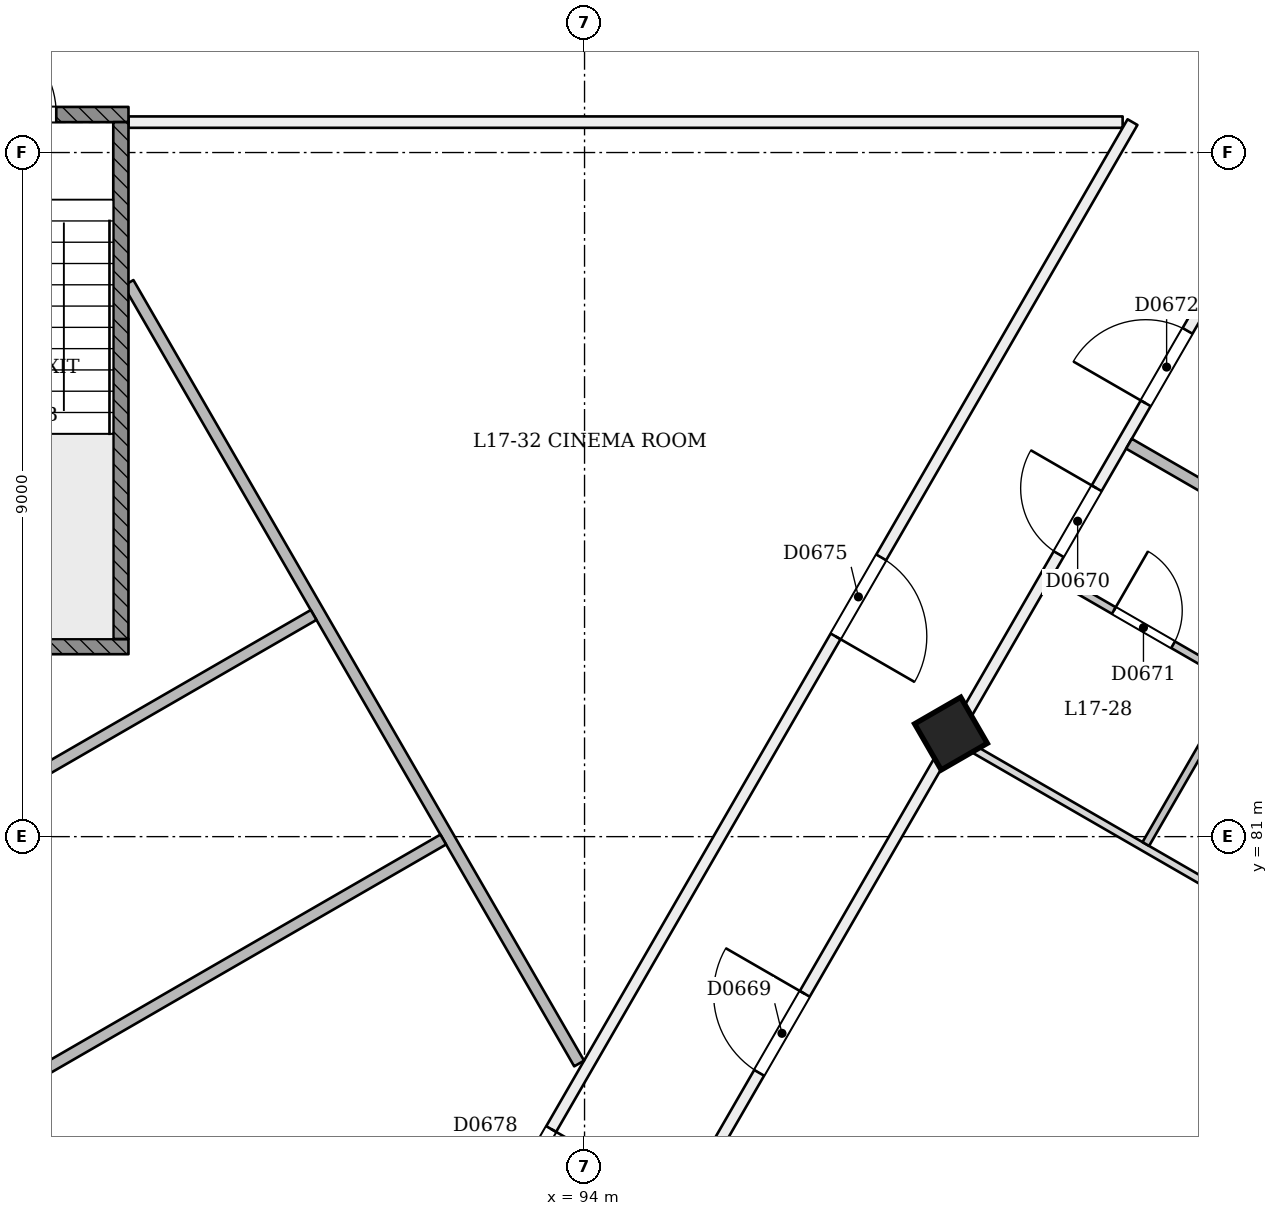
"""IFC4 building model, lengths in metres.
Left out: names, types, materials, properties, quantities, classifications, styles, units other than length and angle.
Written with IfcOpenShell. Run it as: python <this file> out.ifc"""

import sys

from ifc_helpers import new_model, si_unit, direction, frame, frame_2d, origin, origin_2d, place, context, subcontext, project, spatial, rectangle, extrude, element, fill, save


model = new_model("IFC4")
c1 = context("Model", 3, precision=1e-05, world=origin(), true_north=direction((0.0, 1.0)))
c2 = subcontext(c1, "Body", "Model", "MODEL_VIEW")
j1 = project(units=[si_unit("LENGTHUNIT", "METRE"), si_unit("PLANEANGLEUNIT", "RADIAN")], contexts=[c1])
p1 = place(None, origin())
s1 = spatial("IfcSite", under=j1, at=p1, CompositionType="ELEMENT")
p2 = place(p1, origin())
s2 = spatial("IfcBuilding", under=s1, at=p2, CompositionType="ELEMENT")
p3 = place(p2, frame((0.0, 0.0, 70.2)))
s3 = spatial("IfcBuildingStorey", under=s2, at=p3, CompositionType="ELEMENT", Elevation=70.2)
p4 = place(p3, frame((98.848, 82.309, -0.021), z_axis=(-0.022153634206, 0.038480930364, 0.999013730882), x_axis=(-0.501312869297, -0.864981219678, 0.022201276585)))
e1 = element("IfcColumn", 1, at=p4, inside=s3, PredefinedType="COLUMN", context=c2, shape_type="SweptSolid", body=[
    extrude(rectangle(XDim=0.7, YDim=0.7, at=origin_2d()), origin(), (0.0, 0.0, 1.0), 3.604),
])
p5 = place(p3, frame((85.785, 59.686, 0.0), z_axis=(0.0, 0.0, 1.0), x_axis=(0.500002288388, 0.866024082579, 0.0)))
e2 = element("IfcWall", 2, at=p5, inside=s3, PredefinedType="PARTITIONING", context=c2, shape_type="SweptSolid", body=[
    extrude(rectangle(XDim=43.248, YDim=0.15, at=frame_2d((21.624, 0.0))), origin(), (0.0, 0.0, 1.0), 2.7),
])
p6 = place(p5, frame((0.256, 0.0, 0.0)))
e3 = element("IfcOpeningElement", 3, at=p6, cuts=e2, PredefinedType="OPENING", context=c2, shape_type="SweptSolid", body=[
    extrude(rectangle(XDim=1.2, YDim=2.1, at=frame_2d((0.6, 1.05))), frame((0.0, 0.085, 0.0), z_axis=(0.0, -1.0, 0.0), x_axis=(1.0, 0.0, 0.0)), (0.0, 0.0, 1.0), 0.171),
])
p7 = place(p5, frame((4.229, 0.0, 0.0)))
e4 = element("IfcOpeningElement", 4, at=p7, cuts=e2, PredefinedType="OPENING", context=c2, shape_type="SweptSolid", body=[
    extrude(rectangle(XDim=1.0, YDim=2.1, at=frame_2d((0.5, 1.05))), frame((0.0, 0.085, 0.0), z_axis=(0.0, -1.0, 0.0), x_axis=(1.0, 0.0, 0.0)), (0.0, 0.0, 1.0), 0.171),
])
p8 = place(p5, frame((10.904, 0.0, 0.0)))
e5 = element("IfcOpeningElement", 5, at=p8, cuts=e2, PredefinedType="OPENING", context=c2, shape_type="SweptSolid", body=[
    extrude(rectangle(XDim=1.0, YDim=2.1, at=frame_2d((0.5, 1.05))), frame((0.0, 0.085, 0.0), z_axis=(0.0, -1.0, 0.0), x_axis=(1.0, 0.0, 0.0)), (0.0, 0.0, 1.0), 0.171),
])
p9 = place(p5, frame((13.345, 0.0, 0.0)))
e6 = element("IfcOpeningElement", 6, at=p9, cuts=e2, PredefinedType="OPENING", context=c2, shape_type="SweptSolid", body=[
    extrude(rectangle(XDim=1.0, YDim=2.1, at=frame_2d((0.5, 1.05))), frame((0.0, 0.085, 0.0), z_axis=(0.0, -1.0, 0.0), x_axis=(1.0, 0.0, 0.0)), (0.0, 0.0, 1.0), 0.171),
])
p10 = place(p5, frame((21.024, 0.0, 0.0)))
e7 = element("IfcOpeningElement", 7, at=p10, cuts=e2, PredefinedType="OPENING", context=c2, shape_type="SweptSolid", body=[
    extrude(rectangle(XDim=1.2, YDim=2.1, at=frame_2d((0.6, 1.05))), frame((0.0, 0.085, 0.0), z_axis=(0.0, -1.0, 0.0), x_axis=(1.0, 0.0, 0.0)), (0.0, 0.0, 1.0), 0.171),
])
p11 = place(p5, frame((28.904, 0.0, 0.0)))
e8 = element("IfcOpeningElement", 8, at=p11, cuts=e2, PredefinedType="OPENING", context=c2, shape_type="SweptSolid", body=[
    extrude(rectangle(XDim=1.0, YDim=2.1, at=frame_2d((0.5, 1.05))), frame((0.0, 0.085, 0.0), z_axis=(0.0, -1.0, 0.0), x_axis=(1.0, 0.0, 0.0)), (0.0, 0.0, 1.0), 0.171),
])
p12 = place(p5, frame((31.195, 0.0, 0.0)))
e9 = element("IfcOpeningElement", 9, at=p12, cuts=e2, PredefinedType="OPENING", context=c2, shape_type="SweptSolid", body=[
    extrude(rectangle(XDim=1.1, YDim=2.1, at=frame_2d((0.55, 1.05))), frame((0.0, 0.085, 0.0), z_axis=(0.0, -1.0, 0.0), x_axis=(1.0, 0.0, 0.0)), (0.0, 0.0, 1.0), 0.171),
])
p13 = place(p5, frame((38.618, 0.0, 0.0)))
e10 = element("IfcOpeningElement", 10, at=p13, cuts=e2, PredefinedType="OPENING", context=c2, shape_type="SweptSolid", body=[
    extrude(rectangle(XDim=1.2, YDim=2.1, at=frame_2d((0.6, 1.05))), frame((0.0, 0.085, 0.0), z_axis=(0.0, -1.0, 0.0), x_axis=(1.0, 0.0, 0.0)), (0.0, 0.0, 1.0), 0.171),
])
p14 = place(p3, frame((88.0, 90.4, 0.0), z_axis=(0.0, 0.0, 1.0), x_axis=(1.0, 0.0, 0.0)))
e11 = element("IfcWall", 11, at=p14, inside=s3, PredefinedType="PARTITIONING", context=c2, shape_type="SweptSolid", body=[
    extrude(rectangle(XDim=13.079, YDim=0.15, at=frame_2d((6.54, 0.0))), origin(), (0.0, 0.0, 1.0), 3.1),
])
p15 = place(p3, frame((101.209, 90.4, 0.0), z_axis=(0.0, 0.0, 1.0), x_axis=(-0.500001034453, -0.866024806542, 0.0)))
e12 = element("IfcWall", 12, at=p15, inside=s3, PredefinedType="PARTITIONING", context=c2, shape_type="SweptSolid", body=[
    extrude(rectangle(XDim=32.418, YDim=0.15, at=frame_2d((16.209, 0.0))), origin(), (0.0, 0.0, 1.0), 3.1),
])
p16 = place(p15, frame((6.612, 0.0, 0.0)))
e13 = element("IfcOpeningElement", 13, at=p16, cuts=e12, PredefinedType="OPENING", context=c2, shape_type="SweptSolid", body=[
    extrude(rectangle(XDim=1.2, YDim=2.1, at=frame_2d((0.6, 1.05))), frame((0.0, 0.085, 0.0), z_axis=(0.0, -1.0, 0.0), x_axis=(1.0, 0.0, 0.0)), (0.0, 0.0, 1.0), 0.171),
])
p17 = place(p15, frame((15.296, 0.0, 0.0)))
e14 = element("IfcOpeningElement", 14, at=p17, cuts=e12, PredefinedType="OPENING", context=c2, shape_type="SweptSolid", body=[
    extrude(rectangle(XDim=1.2, YDim=2.1, at=frame_2d((0.6, 1.05))), frame((0.0, 0.085, 0.0), z_axis=(0.0, -1.0, 0.0), x_axis=(1.0, 0.0, 0.0)), (0.0, 0.0, 1.0), 0.171),
])
p18 = place(p15, frame((25.157, 0.0, 0.0)))
e15 = element("IfcOpeningElement", 15, at=p18, cuts=e12, PredefinedType="OPENING", context=c2, shape_type="SweptSolid", body=[
    extrude(rectangle(XDim=1.2, YDim=2.1, at=frame_2d((0.6, 1.05))), frame((0.0, 0.085, 0.0), z_axis=(0.0, -1.0, 0.0), x_axis=(1.0, 0.0, 0.0)), (0.0, 0.0, 1.0), 0.171),
])
p19 = place(p3, frame((104.39, 79.11, 0.0), z_axis=(0.0, 0.0, 1.0), x_axis=(-0.866025537322, 0.499999768706, 0.0)))
e16 = element("IfcWall", 16, at=p19, inside=s3, PredefinedType="PARTITIONING", context=c2, shape_type="SweptSolid", body=[
    extrude(rectangle(XDim=6.325, YDim=0.1, at=frame_2d((3.163, 0.0))), origin(), (0.0, 0.0, 1.0), 2.6),
])
p20 = place(p3, frame((100.162, 84.437, 0.0), z_axis=(0.0, 0.0, 1.0), x_axis=(0.866011447264, -0.500024172624, 0.0)))
e17 = element("IfcWall", 17, at=p20, inside=s3, PredefinedType="PARTITIONING", context=c2, shape_type="SweptSolid", body=[
    extrude(rectangle(XDim=2.825, YDim=0.1, at=frame_2d((1.413, 0.0))), origin(), (0.0, 0.0, 1.0), 3.1),
])
p21 = place(p20, frame((0.925, 0.0, 0.0)))
e18 = element("IfcOpeningElement", 18, at=p21, cuts=e17, PredefinedType="OPENING", context=c2, shape_type="SweptSolid", body=[
    extrude(rectangle(XDim=0.9, YDim=2.1, at=frame_2d((0.45, 1.05))), frame((0.0, 0.061, 0.0), z_axis=(0.0, -1.0, 0.0), x_axis=(1.0, 0.0, 0.0)), (0.0, 0.0, 1.0), 0.121),
])
p22 = place(p3, frame((102.609, 83.025, 0.0), z_axis=(0.0, 0.0, 1.0), x_axis=(-0.499987006516, -0.866032905446, 0.0)))
e19 = element("IfcWall", 19, at=p22, inside=s3, PredefinedType="PARTITIONING", context=c2, shape_type="SweptSolid", body=[
    extrude(rectangle(XDim=2.45, YDim=0.1, at=frame_2d((1.225, 0.0))), origin(), (0.0, 0.0, 1.0), 2.7),
])
p23 = place(p3, frame((106.657, 82.997, 0.0), z_axis=(0.0, 0.0, 1.0), x_axis=(-0.866025401434, 0.500000004071, 0.0)))
e20 = element("IfcWall", 20, at=p23, inside=s3, PredefinedType="PARTITIONING", context=c2, shape_type="SweptSolid", body=[
    extrude(rectangle(XDim=6.345, YDim=0.15, at=frame_2d((3.173, 0.0))), origin(), (0.0, 0.0, 1.0), 2.6),
])
p24 = place(p3, frame((88.0, 88.285, 0.0), z_axis=(0.0, 0.0, 1.0), x_axis=(0.499998697147, -0.866026155985, 0.0)))
e21 = element("IfcWall", 21, at=p24, inside=s3, PredefinedType="PARTITIONING", context=c2, shape_type="SweptSolid", body=[
    extrude(rectangle(XDim=11.858, YDim=0.15, at=frame_2d((5.929, 0.0))), origin(), (0.0, 0.0, 1.0), 3.1),
])
p25 = place(p3, frame((77.075, 76.202, 0.0), z_axis=(0.0, 0.0, 1.0), x_axis=(0.866019036803, 0.500011027772, 0.0)))
e22 = element("IfcWall", 22, at=p25, inside=s3, PredefinedType="PARTITIONING", context=c2, shape_type="SweptSolid", body=[
    extrude(rectangle(XDim=15.428, YDim=0.15, at=frame_2d((7.714, 0.0))), origin(), (0.0, 0.0, 1.0), 3.1),
])
p26 = place(p3, frame((92.141, 80.962, 0.0), z_axis=(0.0, 0.0, 1.0), x_axis=(-0.866025889145, -0.499999159329, 0.0)))
e23 = element("IfcWall", 23, at=p26, inside=s3, PredefinedType="PARTITIONING", context=c2, shape_type="SweptSolid", body=[
    extrude(rectangle(XDim=15.428, YDim=0.15, at=frame_2d((7.714, 0.0))), origin(), (0.0, 0.0, 1.0), 3.1),
])
p27 = place(p3, frame((82.0, 90.5, 0.0), z_axis=(0.0, 0.0, 1.0), x_axis=(1.0, 0.0, 0.0)))
e24 = element("IfcWall", 24, at=p27, inside=s3, PredefinedType="SOLIDWALL", context=c2, shape_type="SweptSolid", body=[
    extrude(rectangle(XDim=6.0, YDim=0.2, at=frame_2d((3.0, 0.0))), origin(), (0.0, 0.0, 1.0), 3.1),
])
p28 = place(p27, frame((0.95, 0.0, 0.0)))
e25 = element("IfcOpeningElement", 25, at=p28, cuts=e24, PredefinedType="OPENING", context=c2, shape_type="SweptSolid", body=[
    extrude(rectangle(XDim=1.2, YDim=2.1, at=frame_2d((0.6, 1.05))), frame((0.0, 0.11, 0.0), z_axis=(0.0, -1.0, 0.0), x_axis=(1.0, 0.0, 0.0)), (0.0, 0.0, 1.0), 0.221),
])
p29 = place(p27, frame((3.85, 0.0, 0.0)))
e26 = element("IfcOpeningElement", 26, at=p29, cuts=e24, PredefinedType="OPENING", context=c2, shape_type="SweptSolid", body=[
    extrude(rectangle(XDim=1.2, YDim=2.1, at=frame_2d((0.6, 1.05))), frame((0.0, 0.11, 0.0), z_axis=(0.0, -1.0, 0.0), x_axis=(1.0, 0.0, 0.0)), (0.0, 0.0, 1.0), 0.221),
])
p30 = place(p3, frame((82.0, 83.5, 0.0), z_axis=(0.0, 0.0, 1.0), x_axis=(1.0, 0.0, 0.0)))
e27 = element("IfcWall", 27, at=p30, inside=s3, PredefinedType="SOLIDWALL", context=c2, shape_type="SweptSolid", body=[
    extrude(rectangle(XDim=6.0, YDim=0.2, at=frame_2d((3.0, 0.0))), origin(), (0.0, 0.0, 1.0), 3.1),
])
p31 = place(p3, frame((87.9, 83.6, 0.0), z_axis=(0.0, 0.0, 1.0), x_axis=(0.0, 1.0, 0.0)))
e28 = element("IfcWall", 28, at=p31, inside=s3, PredefinedType="SOLIDWALL", context=c2, shape_type="SweptSolid", body=[
    extrude(rectangle(XDim=6.8, YDim=0.2, at=frame_2d((3.4, 0.0))), origin(), (0.0, 0.0, 1.0), 3.1),
])
p32 = place(p10, origin())
e29 = element("IfcDoor", 29, at=p32, inside=s3, OperationType="SINGLE_SWING_RIGHT", PredefinedType="NOTDEFINED", context=c2, shape_type="SweptSolid", body=[
    extrude(rectangle(XDim=1.2, YDim=2.1, at=frame_2d((0.6, 1.05))), frame((0.0, 0.025, 0.0), z_axis=(0.0, -1.0, 0.0), x_axis=(1.0, 0.0, 0.0)), (0.0, 0.0, 1.0), 0.05),
])
fill(e7, e29)
p33 = place(p11, origin())
e30 = element("IfcDoor", 30, at=p33, inside=s3, OperationType="SINGLE_SWING_RIGHT", PredefinedType="NOTDEFINED", context=c2, shape_type="SweptSolid", body=[
    extrude(rectangle(XDim=1.0, YDim=2.1, at=frame_2d((0.5, 1.05))), frame((0.0, 0.025, 0.0), z_axis=(0.0, -1.0, 0.0), x_axis=(1.0, 0.0, 0.0)), (0.0, 0.0, 1.0), 0.05),
])
fill(e8, e30)
p34 = place(p21, origin())
e31 = element("IfcDoor", 31, at=p34, inside=s3, OperationType="SINGLE_SWING_LEFT", PredefinedType="NOTDEFINED", context=c2, shape_type="SweptSolid", body=[
    extrude(rectangle(XDim=0.9, YDim=2.1, at=frame_2d((0.45, 1.05))), frame((0.0, 0.025, 0.0), z_axis=(0.0, -1.0, 0.0), x_axis=(1.0, 0.0, 0.0)), (0.0, 0.0, 1.0), 0.05),
])
fill(e18, e31)
p35 = place(p12, origin())
e32 = element("IfcDoor", 32, at=p35, inside=s3, OperationType="SINGLE_SWING_LEFT", PredefinedType="NOTDEFINED", context=c2, shape_type="SweptSolid", body=[
    extrude(rectangle(XDim=1.1, YDim=2.1, at=frame_2d((0.55, 1.05))), frame((0.0, 0.025, 0.0), z_axis=(0.0, -1.0, 0.0), x_axis=(1.0, 0.0, 0.0)), (0.0, 0.0, 1.0), 0.05),
])
fill(e9, e32)
p36 = place(p16, origin())
e33 = element("IfcDoor", 33, at=p36, inside=s3, OperationType="SINGLE_SWING_RIGHT", PredefinedType="NOTDEFINED", context=c2, shape_type="SweptSolid", body=[
    extrude(rectangle(XDim=1.2, YDim=2.1, at=frame_2d((0.6, 1.05))), frame((0.0, 0.025, 0.0), z_axis=(0.0, -1.0, 0.0), x_axis=(1.0, 0.0, 0.0)), (0.0, 0.0, 1.0), 0.05),
])
fill(e13, e33)
p37 = place(p17, origin())
e34 = element("IfcDoor", 34, at=p37, inside=s3, OperationType="SINGLE_SWING_LEFT", PredefinedType="NOTDEFINED", context=c2, shape_type="SweptSolid", body=[
    extrude(rectangle(XDim=1.2, YDim=2.1, at=frame_2d((0.6, 1.05))), frame((0.0, 0.025, 0.0), z_axis=(0.0, -1.0, 0.0), x_axis=(1.0, 0.0, 0.0)), (0.0, 0.0, 1.0), 0.05),
])
fill(e14, e34)
p38 = place(p29, origin())
e35 = element("IfcDoor", 35, at=p38, inside=s3, OperationType="SINGLE_SWING_LEFT", PredefinedType="NOTDEFINED", context=c2, shape_type="SweptSolid", body=[
    extrude(rectangle(XDim=1.2, YDim=2.1, at=frame_2d((0.6, 1.05))), frame((0.0, 0.025, 0.0), z_axis=(0.0, -1.0, 0.0), x_axis=(1.0, 0.0, 0.0)), (0.0, 0.0, 1.0), 0.05),
])
fill(e26, e35)
save(model, sys.argv[1])
